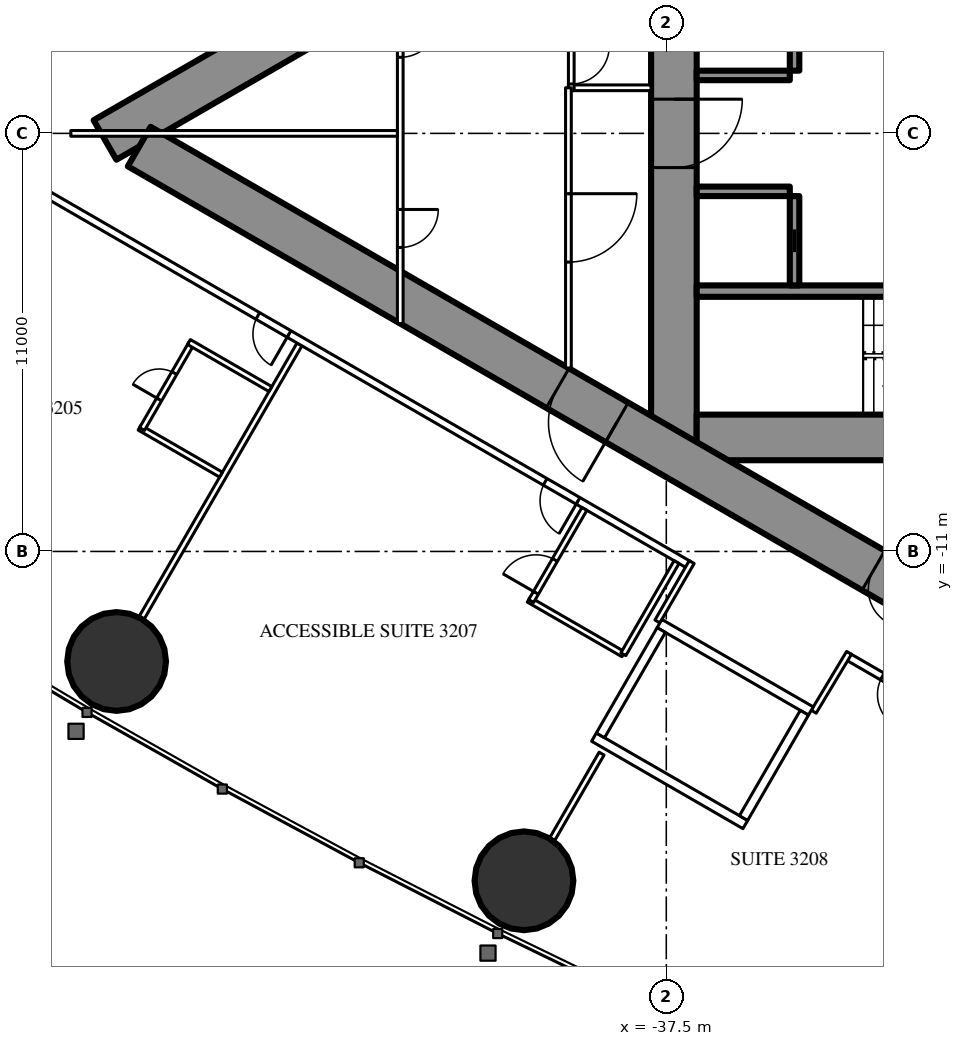
"""IFC4 building model, lengths in metres.
Left out: names, types, materials, properties, quantities, classifications, styles, units other than length and angle.
Written with IfcOpenShell. Run it as: python <this file> out.ifc"""

import sys

from ifc_helpers import new_model, si_unit, direction, frame, frame_2d, origin, origin_2d, place, context, subcontext, project, spatial, rectangle, hollow_circle, extrude, element, fill, save


model = new_model("IFC4")
c1 = context("Model", 3, precision=1e-05, world=origin(), true_north=direction((0.0, 1.0)))
c2 = subcontext(c1, "Body", "Model", "MODEL_VIEW")
j1 = project(units=[si_unit("LENGTHUNIT", "METRE"), si_unit("PLANEANGLEUNIT", "RADIAN")], contexts=[c1])
p1 = place(None, origin())
s1 = spatial("IfcSite", under=j1, at=p1, CompositionType="ELEMENT")
p2 = place(p1, origin())
s2 = spatial("IfcBuilding", under=s1, at=p2, CompositionType="ELEMENT")
p3 = place(p2, frame((0.0, 0.0, 122.1)))
s3 = spatial("IfcBuildingStorey", under=s2, at=p3, CompositionType="ELEMENT", Elevation=122.1)
for number, where, z_axis, x_axis in (
    (1, (-51.963, -13.895, 0.0), (0.0, 0.0, 1.0), (1.0, 0.0, 0.0)),
    (2, (-41.245, -19.666, 0.0), (0.0, 0.0, 1.0), (1.0, 0.0, 0.0)),
):
    element("IfcColumn", number, at=place(p3, frame(where, z_axis=z_axis, x_axis=x_axis)), inside=s3, PredefinedType="COLUMN", context=c2, shape_type="SweptSolid", body=[
        extrude(hollow_circle(Radius=1.3, WallThickness=0.1, at=origin_2d()), origin(), (0.0, 0.0, 1.0), 3.5),
    ])
p4 = place(p3, frame((-37.3, 8.6, 0.0), z_axis=(0.0, 0.0, 1.0), x_axis=(0.0, -1.0, 0.0)))
e3 = element("IfcWall", 3, at=p4, inside=s3, PredefinedType="SHEAR", context=c2, shape_type="SweptSolid", body=[
    extrude(rectangle(XDim=17.2, YDim=1.2, at=frame_2d((8.6, 0.0))), origin(), (0.0, 0.0, 1.0), 3.5),
])
p5 = place(p4, frame((7.7, 0.0, 0.0)))
e4 = element("IfcOpeningElement", 4, at=p5, cuts=e3, PredefinedType="OPENING", context=c2, shape_type="SweptSolid", body=[
    extrude(rectangle(XDim=1.8, YDim=2.2, at=frame_2d((0.9, 1.1))), frame((0.0, 0.61, 0.0), z_axis=(0.0, -1.0, 0.0), x_axis=(1.0, 0.0, 0.0)), (0.0, 0.0, 1.0), 1.22),
])
p6 = place(p3, frame((-28.3, -8.0, 0.0), z_axis=(0.0, 0.0, 1.0), x_axis=(-1.0, 0.0, 0.0)))
e5 = element("IfcWall", 5, at=p6, inside=s3, PredefinedType="SHEAR", context=c2, shape_type="SweptSolid", body=[
    extrude(rectangle(XDim=8.4, YDim=1.2, at=frame_2d((4.2, 0.0))), origin(), (0.0, 0.0, 1.0), 3.5),
])
p7 = place(p6, frame((0.25, 0.0, 0.0)))
e6 = element("IfcOpeningElement", 6, at=p7, cuts=e5, PredefinedType="OPENING", context=c2, shape_type="SweptSolid", body=[
    extrude(rectangle(XDim=1.0, YDim=2.2, at=frame_2d((0.5, 1.1))), frame((0.0, 0.61, 0.0), z_axis=(0.0, -1.0, 0.0), x_axis=(1.0, 0.0, 0.0)), (0.0, 0.0, 1.0), 1.22),
])
p8 = place(p3, frame((-28.3, -4.15, 0.0), z_axis=(0.0, 0.0, 1.0), x_axis=(-1.0, 0.0, 0.0)))
e7 = element("IfcWall", 7, at=p8, inside=s3, PredefinedType="SHEAR", context=c2, shape_type="SweptSolid", body=[
    extrude(rectangle(XDim=8.4, YDim=0.3, at=frame_2d((4.2, 0.0))), origin(), (0.0, 0.0, 1.0), 3.5),
])
p9 = place(p3, frame((-34.125, 4.0, 0.0), z_axis=(0.0, 0.0, 1.0), x_axis=(0.0, -1.0, 0.0)))
e8 = element("IfcWall", 8, at=p9, inside=s3, PredefinedType="SHEAR", context=c2, shape_type="SweptSolid", body=[
    extrude(rectangle(XDim=2.35, YDim=0.25, at=frame_2d((1.175, 0.0))), origin(), (0.0, 0.0, 1.0), 3.5),
])
p10 = place(p9, frame((0.875, 0.0, 0.0)))
e9 = element("IfcOpeningElement", 9, at=p10, cuts=e8, PredefinedType="OPENING", context=c2, shape_type="SweptSolid", body=[
    extrude(rectangle(XDim=0.6, YDim=2.0, at=frame_2d((0.3, 1.0))), frame((0.0, 0.135, 0.0), z_axis=(0.0, -1.0, 0.0), x_axis=(1.0, 0.0, 0.0)), (0.0, 0.0, 1.0), 0.27),
])
p11 = place(p3, frame((-34.25, 1.525, 0.0), z_axis=(0.0, 0.0, 1.0), x_axis=(-1.0, 0.0, 0.0)))
e10 = element("IfcWall", 10, at=p11, inside=s3, PredefinedType="SHEAR", context=c2, shape_type="SweptSolid", body=[
    extrude(rectangle(XDim=2.45, YDim=0.25, at=frame_2d((1.225, 0.0))), origin(), (0.0, 0.0, 1.0), 3.5),
])
p12 = place(p3, frame((-34.125, -1.65, 0.0), z_axis=(0.0, 0.0, 1.0), x_axis=(0.0, -1.0, 0.0)))
e11 = element("IfcWall", 11, at=p12, inside=s3, PredefinedType="SHEAR", context=c2, shape_type="SweptSolid", body=[
    extrude(rectangle(XDim=2.35, YDim=0.25, at=frame_2d((1.175, 0.0))), origin(), (0.0, 0.0, 1.0), 3.5),
])
p13 = place(p12, frame((0.875, 0.0, 0.0)))
e12 = element("IfcOpeningElement", 12, at=p13, cuts=e11, PredefinedType="OPENING", context=c2, shape_type="SweptSolid", body=[
    extrude(rectangle(XDim=0.6, YDim=2.0, at=frame_2d((0.3, 1.0))), frame((0.0, 0.135, 0.0), z_axis=(0.0, -1.0, 0.0), x_axis=(1.0, 0.0, 0.0)), (0.0, 0.0, 1.0), 0.27),
])
p14 = place(p3, frame((-34.25, -1.525, 0.0), z_axis=(0.0, 0.0, 1.0), x_axis=(-1.0, 0.0, 0.0)))
e13 = element("IfcWall", 13, at=p14, inside=s3, PredefinedType="SHEAR", context=c2, shape_type="SweptSolid", body=[
    extrude(rectangle(XDim=2.45, YDim=0.25, at=frame_2d((1.225, 0.0))), origin(), (0.0, 0.0, 1.0), 3.5),
])
p15 = place(p3, frame((-27.2, 14.3, 0.0), z_axis=(0.0, 0.0, 1.0), x_axis=(-0.866026593062, -0.499997940104, 0.0)))
e14 = element("IfcWall", 14, at=p15, inside=s3, PredefinedType="SHEAR", context=c2, shape_type="SweptSolid", body=[
    extrude(rectangle(XDim=28.946, YDim=1.2, at=frame_2d((14.473, 0.0))), origin(), (0.0, 0.0, 1.0), 3.5),
])
p16 = place(p15, frame((4.6, 0.0, 0.0)))
e15 = element("IfcOpeningElement", 15, at=p16, cuts=e14, PredefinedType="OPENING", context=c2, shape_type="SweptSolid", body=[
    extrude(rectangle(XDim=1.0, YDim=2.2, at=frame_2d((0.5, 1.1))), frame((0.0, 0.61, 0.0), z_axis=(0.0, -1.0, 0.0), x_axis=(1.0, 0.0, 0.0)), (0.0, 0.0, 1.0), 1.22),
])
p17 = place(p15, frame((13.395, 0.0, 0.0)))
e16 = element("IfcOpeningElement", 16, at=p17, cuts=e14, PredefinedType="OPENING", context=c2, shape_type="SweptSolid", body=[
    extrude(rectangle(XDim=1.8, YDim=2.2, at=frame_2d((0.9, 1.1))), frame((0.0, 0.61, 0.0), z_axis=(0.0, -1.0, 0.0), x_axis=(1.0, 0.0, 0.0)), (0.0, 0.0, 1.0), 1.22),
])
p18 = place(p3, frame((-27.2, -14.3, 0.0), z_axis=(0.0, 0.0, 1.0), x_axis=(-0.866024021859, 0.500002393557, 0.0)))
e17 = element("IfcWall", 17, at=p18, inside=s3, PredefinedType="SHEAR", context=c2, shape_type="SweptSolid", body=[
    extrude(rectangle(XDim=27.907, YDim=1.2, at=frame_2d((13.954, 0.0))), origin(), (0.0, 0.0, 1.0), 3.5),
])
p19 = place(p18, frame((4.6, 0.0, 0.0)))
e18 = element("IfcOpeningElement", 18, at=p19, cuts=e17, PredefinedType="OPENING", context=c2, shape_type="SweptSolid", body=[
    extrude(rectangle(XDim=1.0, YDim=2.2, at=frame_2d((0.5, 1.1))), frame((0.0, 0.61, 0.0), z_axis=(0.0, -1.0, 0.0), x_axis=(1.0, 0.0, 0.0)), (0.0, 0.0, 1.0), 1.22),
])
p20 = place(p18, frame((13.395, 0.0, 0.0)))
e19 = element("IfcOpeningElement", 19, at=p20, cuts=e17, PredefinedType="OPENING", context=c2, shape_type="SweptSolid", body=[
    extrude(rectangle(XDim=1.8, YDim=2.2, at=frame_2d((0.9, 1.1))), frame((0.0, 0.61, 0.0), z_axis=(0.0, -1.0, 0.0), x_axis=(1.0, 0.0, 0.0)), (0.0, 0.0, 1.0), 1.22),
])
p21 = place(p3, frame((-47.151, -5.552, 0.0), z_axis=(0.0, 0.0, 1.0), x_axis=(-0.500003012045, -0.866023664773, 0.0)))
e20 = element("IfcWall", 20, at=p21, inside=s3, PredefinedType="PARTITIONING", context=c2, shape_type="SweptSolid", body=[
    extrude(rectangle(XDim=8.311, YDim=0.15, at=frame_2d((4.156, 0.0))), origin(), (0.0, 0.0, 1.0), 2.2),
])
p22 = place(p3, frame((-39.202, -16.32, 0.0), z_axis=(0.0, 0.0, 1.0), x_axis=(-0.49997716683, -0.86603858612, 0.0)))
e21 = element("IfcWall", 21, at=p22, inside=s3, PredefinedType="PARTITIONING", context=c2, shape_type="SweptSolid", body=[
    extrude(rectangle(XDim=2.6, YDim=0.15, at=frame_2d((1.3, 0.0))), origin(), (0.0, 0.0, 1.0), 3.25),
])
p23 = place(p3, frame((-27.572, -16.741, 0.0), z_axis=(0.0, 0.0, 1.0), x_axis=(-0.866024464444, 0.500001626982, 0.0)))
e22 = element("IfcWall", 22, at=p23, inside=s3, PredefinedType="PARTITIONING", context=c2, shape_type="SweptSolid", body=[
    extrude(rectangle(XDim=5.955, YDim=0.2, at=frame_2d((2.978, 0.0))), origin(), (0.0, 0.0, 1.0), 3.25),
])
p24 = place(p23, frame((3.95, 0.0, 0.0)))
e23 = element("IfcOpeningElement", 23, at=p24, cuts=e22, PredefinedType="OPENING", context=c2, shape_type="SweptSolid", body=[
    extrude(rectangle(XDim=0.95, YDim=2.2, at=frame_2d((0.475, 1.1))), frame((0.0, 0.11, 0.0), z_axis=(0.0, -1.0, 0.0), x_axis=(1.0, 0.0, 0.0)), (0.0, 0.0, 1.0), 0.22),
])
p25 = place(p3, frame((-36.92, -11.344, 0.0), z_axis=(0.0, 0.0, 1.0), x_axis=(-0.866028313256, 0.499994960614, 0.0)))
e24 = element("IfcWall", 24, at=p25, inside=s3, PredefinedType="PARTITIONING", context=c2, shape_type="SweptSolid", body=[
    extrude(rectangle(XDim=22.568, YDim=0.2, at=frame_2d((11.284, 0.0))), origin(), (0.0, 0.0, 1.0), 3.25),
])
p26 = place(p25, frame((12.131, 0.0, 0.0)))
e25 = element("IfcOpeningElement", 25, at=p26, cuts=e24, PredefinedType="OPENING", context=c2, shape_type="SweptSolid", body=[
    extrude(rectangle(XDim=0.95, YDim=2.2, at=frame_2d((0.475, 1.1))), frame((0.0, 0.11, 0.0), z_axis=(0.0, -1.0, 0.0), x_axis=(1.0, 0.0, 0.0)), (0.0, 0.0, 1.0), 0.22),
])
p27 = place(p25, frame((3.35, 0.0, 0.0)))
e26 = element("IfcOpeningElement", 26, at=p27, cuts=e24, PredefinedType="OPENING", context=c2, shape_type="SweptSolid", body=[
    extrude(rectangle(XDim=1.0, YDim=2.2, at=frame_2d((0.5, 1.1))), frame((0.0, 0.11, 0.0), z_axis=(0.0, -1.0, 0.0), x_axis=(1.0, 0.0, 0.0)), (0.0, 0.0, 1.0), 0.22),
])
p28 = place(p3, frame((-36.831, -11.28, 0.0), z_axis=(0.0, 0.0, 1.0), x_axis=(-0.499937177781, -0.866061671171, 0.0)))
e27 = element("IfcWall", 27, at=p28, inside=s3, PredefinedType="PARTITIONING", context=c2, shape_type="SweptSolid", body=[
    extrude(rectangle(XDim=1.804, YDim=0.15, at=frame_2d((0.902, 0.0))), origin(), (0.0, 0.0, 1.0), 3.25),
])
p29 = place(p3, frame((-33.621, -15.218, 0.0), z_axis=(0.0, 0.0, 1.0), x_axis=(0.514336634837, 0.857588377991, 0.0)))
e28 = element("IfcWall", 28, at=p29, inside=s3, PredefinedType="PARTITIONING", context=c2, shape_type="SweptSolid", body=[
    extrude(rectangle(XDim=1.805, YDim=0.15, at=frame_2d((0.903, 0.0))), origin(), (0.0, 0.0, 1.0), 3.25),
])
p30 = place(p3, frame((-49.216, -8.979, 0.0), z_axis=(0.0, 0.0, 1.0), x_axis=(-0.866031185235, 0.4999899861, 0.0)))
e29 = element("IfcWall", 29, at=p30, inside=s3, PredefinedType="PARTITIONING", context=c2, shape_type="SweptSolid", body=[
    extrude(rectangle(XDim=2.475, YDim=0.15, at=frame_2d((1.238, 0.0))), origin(), (0.0, 0.0, 1.0), 3.25),
])
p31 = place(p3, frame((-49.995, -5.527, 0.0), z_axis=(0.0, 0.0, 1.0), x_axis=(-0.500006934395, -0.866021400173, 0.0)))
e30 = element("IfcWall", 30, at=p31, inside=s3, PredefinedType="PARTITIONING", context=c2, shape_type="SweptSolid", body=[
    extrude(rectangle(XDim=2.6, YDim=0.15, at=frame_2d((1.3, 0.0))), origin(), (0.0, 0.0, 1.0), 3.25),
])
p32 = place(p31, frame((0.9, 0.0, 0.0)))
e31 = element("IfcOpeningElement", 31, at=p32, cuts=e30, PredefinedType="OPENING", context=c2, shape_type="SweptSolid", body=[
    extrude(rectangle(XDim=0.8, YDim=2.2, at=frame_2d((0.4, 1.1))), frame((0.0, 0.085, 0.0), z_axis=(0.0, -1.0, 0.0), x_axis=(1.0, 0.0, 0.0)), (0.0, 0.0, 1.0), 0.17),
])
p33 = place(p3, frame((-47.916, -6.727, 0.0), z_axis=(0.0, 0.0, 1.0), x_axis=(-0.866031185235, 0.4999899861, 0.0)))
e32 = element("IfcWall", 32, at=p33, inside=s3, PredefinedType="PARTITIONING", context=c2, shape_type="SweptSolid", body=[
    extrude(rectangle(XDim=2.475, YDim=0.15, at=frame_2d((1.238, 0.0))), origin(), (0.0, 0.0, 1.0), 3.25),
])
p34 = place(p3, frame((-38.63, -13.705, 0.0), z_axis=(0.0, 0.0, 1.0), x_axis=(-0.866018712932, 0.500011588718, 0.0)))
e33 = element("IfcWall", 33, at=p34, inside=s3, PredefinedType="PARTITIONING", context=c2, shape_type="SweptSolid", body=[
    extrude(rectangle(XDim=2.875, YDim=0.15, at=frame_2d((1.438, 0.0))), origin(), (0.0, 0.0, 1.0), 3.25),
])
p35 = place(p3, frame((-39.655, -9.88, 0.0), z_axis=(0.0, 0.0, 1.0), x_axis=(-0.500049511043, -0.865996816683, 0.0)))
e34 = element("IfcWall", 34, at=p35, inside=s3, PredefinedType="PARTITIONING", context=c2, shape_type="SweptSolid", body=[
    extrude(rectangle(XDim=2.8, YDim=0.15, at=frame_2d((1.4, 0.0))), origin(), (0.0, 0.0, 1.0), 3.25),
])
p36 = place(p35, frame((1.55, 0.0, 0.0)))
e35 = element("IfcOpeningElement", 35, at=p36, cuts=e34, PredefinedType="OPENING", context=c2, shape_type="SweptSolid", body=[
    extrude(rectangle(XDim=1.0, YDim=2.2, at=frame_2d((0.5, 1.1))), frame((0.0, 0.085, 0.0), z_axis=(0.0, -1.0, 0.0), x_axis=(1.0, 0.0, 0.0)), (0.0, 0.0, 1.0), 0.17),
])
p37 = place(p3, frame((-37.23, -11.281, 0.0), z_axis=(0.0, 0.0, 1.0), x_axis=(-0.500049511043, -0.865996816683, 0.0)))
e36 = element("IfcWall", 36, at=p37, inside=s3, PredefinedType="PARTITIONING", context=c2, shape_type="SweptSolid", body=[
    extrude(rectangle(XDim=2.8, YDim=0.15, at=frame_2d((1.4, 0.0))), origin(), (0.0, 0.0, 1.0), 3.25),
])
p38 = place(p3, frame((-37.9, 1.2, 0.0), z_axis=(0.0, 0.0, 1.0), x_axis=(-1.0, 0.0, 0.0)))
e37 = element("IfcWall", 37, at=p38, inside=s3, PredefinedType="PARTITIONING", context=c2, shape_type="SweptSolid", body=[
    extrude(rectangle(XDim=2.175, YDim=0.15, at=frame_2d((1.087, 0.0))), origin(), (0.0, 0.0, 1.0), 3.25),
])
p39 = place(p3, frame((-40.0, 2.475, 0.0), z_axis=(0.0, 0.0, 1.0), x_axis=(0.0, -1.0, 0.0)))
e38 = element("IfcWall", 38, at=p39, inside=s3, PredefinedType="PARTITIONING", context=c2, shape_type="SweptSolid", body=[
    extrude(rectangle(XDim=1.35, YDim=0.15, at=frame_2d((0.675, 0.0))), origin(), (0.0, 0.0, 1.0), 3.25),
])
p40 = place(p39, frame((0.175, 0.0, 0.0)))
e39 = element("IfcOpeningElement", 39, at=p40, cuts=e38, PredefinedType="OPENING", context=c2, shape_type="SweptSolid", body=[
    extrude(rectangle(XDim=1.0, YDim=2.2, at=frame_2d((0.5, 1.1))), frame((0.0, 0.085, 0.0), z_axis=(0.0, -1.0, 0.0), x_axis=(1.0, 0.0, 0.0)), (0.0, 0.0, 1.0), 0.17),
])
p41 = place(p3, frame((-40.075, 1.2, 0.0), z_axis=(0.0, 0.0, 1.0), x_axis=(0.0, -1.0, 0.0)))
e40 = element("IfcWall", 40, at=p41, inside=s3, PredefinedType="PARTITIONING", context=c2, shape_type="SweptSolid", body=[
    extrude(rectangle(XDim=7.374, YDim=0.15, at=frame_2d((3.687, 0.0))), origin(), (0.0, 0.0, 1.0), 3.25),
])
p42 = place(p41, frame((2.787, 0.0, 0.0)))
e41 = element("IfcOpeningElement", 41, at=p42, cuts=e40, PredefinedType="OPENING", context=c2, shape_type="SweptSolid", body=[
    extrude(rectangle(XDim=1.8, YDim=2.2, at=frame_2d((0.9, 1.1))), frame((0.0, 0.085, 0.0), z_axis=(0.0, -1.0, 0.0), x_axis=(1.0, 0.0, 0.0)), (0.0, 0.0, 1.0), 0.17),
])
p43 = place(p3, frame((-44.5, 5.005, 0.0), z_axis=(0.0, 0.0, 1.0), x_axis=(0.0, -1.0, 0.0)))
e42 = element("IfcWall", 42, at=p43, inside=s3, PredefinedType="PARTITIONING", context=c2, shape_type="SweptSolid", body=[
    extrude(rectangle(XDim=10.009, YDim=0.15, at=frame_2d((5.005, 0.0))), origin(), (0.0, 0.0, 1.0), 2.45),
])
p44 = place(p43, frame((2.002, 0.0, 0.0)))
e43 = element("IfcOpeningElement", 43, at=p44, cuts=e42, PredefinedType="OPENING", context=c2, shape_type="SweptSolid", body=[
    extrude(rectangle(XDim=1.0, YDim=2.2, at=frame_2d((0.5, 1.1))), frame((0.0, 0.085, 0.0), z_axis=(0.0, -1.0, 0.0), x_axis=(1.0, 0.0, 0.0)), (0.0, 0.0, 1.0), 0.17),
])
p45 = place(p43, frame((7.007, 0.0, 0.0)))
e44 = element("IfcOpeningElement", 44, at=p45, cuts=e42, PredefinedType="OPENING", context=c2, shape_type="SweptSolid", body=[
    extrude(rectangle(XDim=1.0, YDim=2.2, at=frame_2d((0.5, 1.1))), frame((0.0, 0.085, 0.0), z_axis=(0.0, -1.0, 0.0), x_axis=(1.0, 0.0, 0.0)), (0.0, 0.0, 1.0), 0.17),
])
p46 = place(p3, frame((-44.575, 0.0, 0.0), z_axis=(0.0, 0.0, 1.0), x_axis=(-1.0, 0.0, 0.0)))
e45 = element("IfcWall", 45, at=p46, inside=s3, PredefinedType="PARTITIONING", context=c2, shape_type="SweptSolid", body=[
    extrude(rectangle(XDim=8.593, YDim=0.15, at=frame_2d((4.297, 0.0))), origin(), (0.0, 0.0, 1.0), 2.2),
])
p47 = place(p3, frame((-33.696, -15.197, 0.0), z_axis=(0.0, 0.0, 1.0), x_axis=(-0.865976953817, 0.500083908417, 0.0)))
e46 = element("IfcWall", 46, at=p47, inside=s3, PredefinedType="PARTITIONING", context=c2, shape_type="SweptSolid", body=[
    extrude(rectangle(XDim=4.599, YDim=0.25, at=frame_2d((2.3, 0.0))), origin(), (0.0, 0.0, 1.0), 3.25),
])
p48 = place(p3, frame((-35.42, -18.186, 0.0), z_axis=(0.0, 0.0, 1.0), x_axis=(-0.865990227814, 0.50006092162, 0.0)))
e47 = element("IfcWall", 47, at=p48, inside=s3, PredefinedType="PARTITIONING", context=c2, shape_type="SweptSolid", body=[
    extrude(rectangle(XDim=4.6, YDim=0.25, at=frame_2d((2.3, 0.0))), origin(), (0.0, 0.0, 1.0), 3.25),
])
p49 = place(p3, frame((-33.866, -15.243, 0.0), z_axis=(0.0, 0.0, 1.0), x_axis=(-0.499929347863, -0.866066190972, 0.0)))
e48 = element("IfcWall", 48, at=p49, inside=s3, PredefinedType="PARTITIONING", context=c2, shape_type="SweptSolid", body=[
    extrude(rectangle(XDim=3.201, YDim=0.25, at=frame_2d((1.6, 0.0))), origin(), (0.0, 0.0, 1.0), 3.25),
])
p50 = place(p3, frame((-37.633, -13.068, 0.0), z_axis=(0.0, 0.0, 1.0), x_axis=(-0.499872130319, -0.866099216793, 0.0)))
e49 = element("IfcWall", 49, at=p50, inside=s3, PredefinedType="PARTITIONING", context=c2, shape_type="SweptSolid", body=[
    extrude(rectangle(XDim=3.2, YDim=0.25, at=frame_2d((1.6, 0.0))), origin(), (0.0, 0.0, 1.0), 3.25),
])
p51 = place(p32, origin())
e50 = element("IfcDoor", 50, at=p51, inside=s3, OperationType="SINGLE_SWING_RIGHT", PredefinedType="DOOR", context=c2, shape_type="SweptSolid", body=[
    extrude(rectangle(XDim=0.8, YDim=2.2, at=frame_2d((0.4, 1.1))), frame((0.0, 0.025, 0.0), z_axis=(0.0, -1.0, 0.0), x_axis=(1.0, 0.0, 0.0)), (0.0, 0.0, 1.0), 0.05),
])
fill(e31, e50)
p52 = place(p26, origin())
e51 = element("IfcDoor", 51, at=p52, inside=s3, OperationType="SINGLE_SWING_LEFT", PredefinedType="DOOR", context=c2, shape_type="SweptSolid", body=[
    extrude(rectangle(XDim=0.95, YDim=2.2, at=frame_2d((0.475, 1.1))), frame((0.0, 0.025, 0.0), z_axis=(0.0, -1.0, 0.0), x_axis=(1.0, 0.0, 0.0)), (0.0, 0.0, 1.0), 0.05),
])
fill(e25, e51)
p53 = place(p36, origin())
e52 = element("IfcDoor", 52, at=p53, inside=s3, OperationType="SINGLE_SWING_RIGHT", PredefinedType="DOOR", context=c2, shape_type="SweptSolid", body=[
    extrude(rectangle(XDim=1.0, YDim=2.2, at=frame_2d((0.5, 1.1))), frame((0.0, 0.025, 0.0), z_axis=(0.0, -1.0, 0.0), x_axis=(1.0, 0.0, 0.0)), (0.0, 0.0, 1.0), 0.05),
])
fill(e35, e52)
p54 = place(p27, origin())
e53 = element("IfcDoor", 53, at=p54, inside=s3, OperationType="SINGLE_SWING_LEFT", PredefinedType="DOOR", context=c2, shape_type="SweptSolid", body=[
    extrude(rectangle(XDim=1.0, YDim=2.2, at=frame_2d((0.5, 1.1))), frame((0.0, 0.025, 0.0), z_axis=(0.0, -1.0, 0.0), x_axis=(1.0, 0.0, 0.0)), (0.0, 0.0, 1.0), 0.05),
])
fill(e26, e53)
p55 = place(p24, origin())
e54 = element("IfcDoor", 54, at=p55, inside=s3, OperationType="SINGLE_SWING_LEFT", PredefinedType="DOOR", context=c2, shape_type="SweptSolid", body=[
    extrude(rectangle(XDim=0.95, YDim=2.2, at=frame_2d((0.475, 1.1))), frame((0.0, 0.025, 0.0), z_axis=(0.0, -1.0, 0.0), x_axis=(1.0, 0.0, 0.0)), (0.0, 0.0, 1.0), 0.05),
])
fill(e23, e54)
p56 = place(p40, origin())
e55 = element("IfcDoor", 55, at=p56, inside=s3, OperationType="SINGLE_SWING_LEFT", PredefinedType="DOOR", context=c2, shape_type="SweptSolid", body=[
    extrude(rectangle(XDim=1.0, YDim=2.2, at=frame_2d((0.5, 1.1))), frame((0.0, 0.025, 0.0), z_axis=(0.0, -1.0, 0.0), x_axis=(1.0, 0.0, 0.0)), (0.0, 0.0, 1.0), 0.05),
])
fill(e39, e55)
p57 = place(p42, origin())
e56 = element("IfcDoor", 56, at=p57, inside=s3, OperationType="DOUBLE_DOOR_SINGLE_SWING", PredefinedType="DOOR", context=c2, shape_type="SweptSolid", body=[
    extrude(rectangle(XDim=1.8, YDim=2.2, at=frame_2d((0.9, 1.1))), frame((0.0, 0.025, 0.0), z_axis=(0.0, -1.0, 0.0), x_axis=(1.0, 0.0, 0.0)), (0.0, 0.0, 1.0), 0.05),
])
fill(e41, e56)
p58 = place(p44, origin())
e57 = element("IfcDoor", 57, at=p58, inside=s3, OperationType="SINGLE_SWING_LEFT", PredefinedType="DOOR", context=c2, shape_type="SweptSolid", body=[
    extrude(rectangle(XDim=1.0, YDim=2.2, at=frame_2d((0.5, 1.1))), frame((0.0, 0.025, 0.0), z_axis=(0.0, -1.0, 0.0), x_axis=(1.0, 0.0, 0.0)), (0.0, 0.0, 1.0), 0.05),
])
fill(e43, e57)
p59 = place(p45, origin())
e58 = element("IfcDoor", 58, at=p59, inside=s3, OperationType="SINGLE_SWING_LEFT", PredefinedType="DOOR", context=c2, shape_type="SweptSolid", body=[
    extrude(rectangle(XDim=1.0, YDim=2.2, at=frame_2d((0.5, 1.1))), frame((0.0, 0.025, 0.0), z_axis=(0.0, -1.0, 0.0), x_axis=(1.0, 0.0, 0.0)), (0.0, 0.0, 1.0), 0.05),
])
fill(e44, e58)
p60 = place(p19, origin())
e59 = element("IfcDoor", 59, at=p60, inside=s3, OperationType="SINGLE_SWING_LEFT", PredefinedType="DOOR", context=c2, shape_type="SweptSolid", body=[
    extrude(rectangle(XDim=1.0, YDim=2.2, at=frame_2d((0.5, 1.1))), frame((0.0, 0.025, 0.0), z_axis=(0.0, -1.0, 0.0), x_axis=(1.0, 0.0, 0.0)), (0.0, 0.0, 1.0), 0.05),
])
fill(e18, e59)
p61 = place(p20, origin())
e60 = element("IfcDoor", 60, at=p61, inside=s3, OperationType="DOUBLE_DOOR_SINGLE_SWING", PredefinedType="DOOR", context=c2, shape_type="SweptSolid", body=[
    extrude(rectangle(XDim=1.8, YDim=2.2, at=frame_2d((0.9, 1.1))), frame((0.0, 0.025, 0.0), z_axis=(0.0, -1.0, 0.0), x_axis=(1.0, 0.0, 0.0)), (0.0, 0.0, 1.0), 0.05),
])
fill(e19, e60)
p62 = place(p5, origin())
e61 = element("IfcDoor", 61, at=p62, inside=s3, OperationType="DOUBLE_DOOR_SINGLE_SWING", PredefinedType="DOOR", context=c2, shape_type="SweptSolid", body=[
    extrude(rectangle(XDim=1.8, YDim=2.2, at=frame_2d((0.9, 1.1))), frame((0.0, 0.025, 0.0), z_axis=(0.0, -1.0, 0.0), x_axis=(1.0, 0.0, 0.0)), (0.0, 0.0, 1.0), 0.05),
])
fill(e4, e61)
p63 = place(p13, origin())
e62 = element("IfcDoor", 62, at=p63, inside=s3, OperationType="SLIDING_TO_LEFT", PredefinedType="DOOR", context=c2, shape_type="SweptSolid", body=[
    extrude(rectangle(XDim=0.6, YDim=2.0, at=frame_2d((0.3, 1.0))), frame((0.0, 0.025, 0.0), z_axis=(0.0, -1.0, 0.0), x_axis=(1.0, 0.0, 0.0)), (0.0, 0.0, 1.0), 0.05),
])
fill(e12, e62)
save(model, sys.argv[1])
